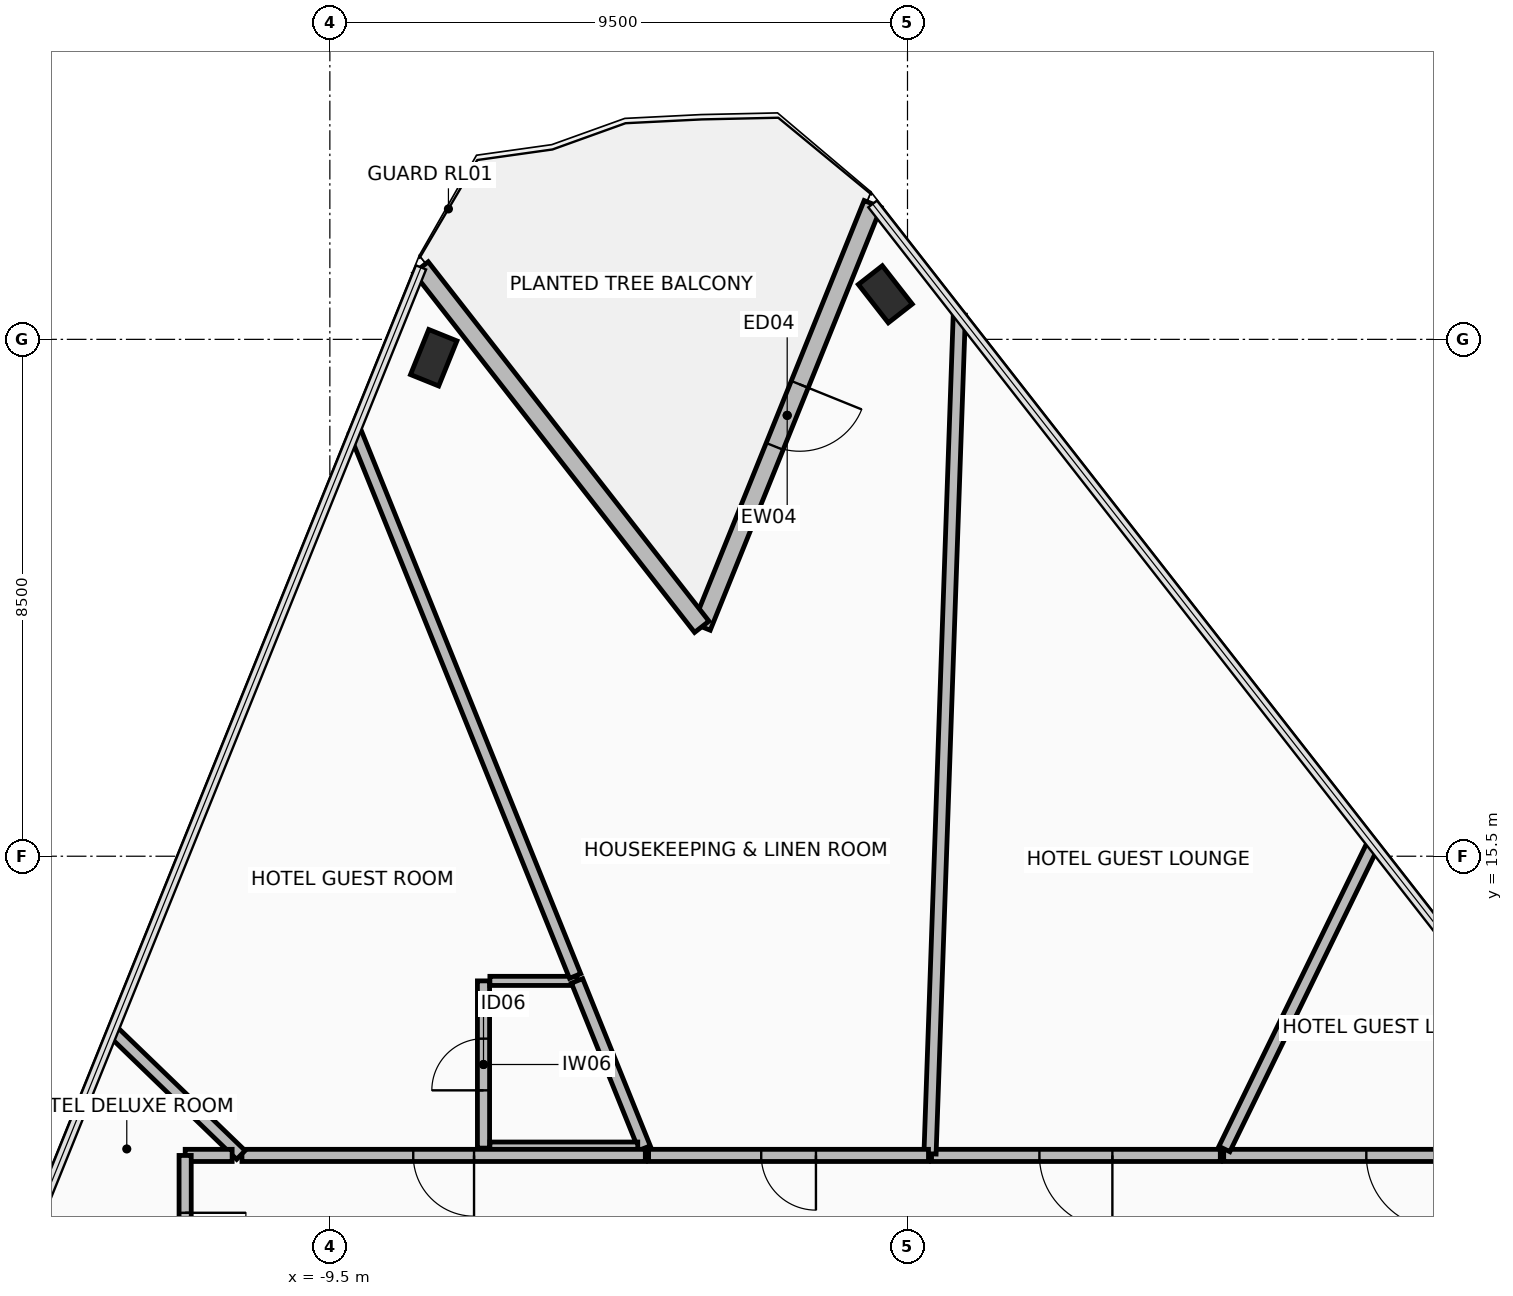
"""IFC4 building model, lengths in metres.
Left out: names, types, materials, properties, quantities, classifications, styles, units other than length and angle.
Written with IfcOpenShell. Run it as: python <this file> out.ifc"""

import sys

from ifc_helpers import new_model, si_unit, direction, frame, frame_2d, origin, origin_2d, place, context, subcontext, project, spatial, rectangle, hollow_rectangle, extrude, element, fill, save


model = new_model("IFC4")
c1 = context("Model", 3, precision=1e-05, world=origin(), true_north=direction((0.0, 1.0)))
c2 = subcontext(c1, "Body", "Model", "MODEL_VIEW")
j1 = project(units=[si_unit("LENGTHUNIT", "METRE"), si_unit("PLANEANGLEUNIT", "RADIAN")], contexts=[c1])
p1 = place(None, origin())
s1 = spatial("IfcSite", under=j1, at=p1, CompositionType="ELEMENT")
p2 = place(p1, origin())
s2 = spatial("IfcBuilding", under=s1, at=p2, CompositionType="ELEMENT")
p3 = place(p2, frame((0.0, 0.0, 67.3)))
s3 = spatial("IfcBuildingStorey", under=s2, at=p3, CompositionType="ELEMENT", Elevation=67.3)
for number, where, z_axis, x_axis in (
    (1, (-7.792, 23.698, 0.0), (0.0, 0.0, 1.0), (0.375, 0.927, 0.0)),
    (2, (-0.365, 24.741, 0.0), (0.0, 0.0, 1.0), (-0.616, 0.788, 0.0)),
):
    element("IfcColumn", number, at=place(p3, frame(where, z_axis=z_axis, x_axis=x_axis)), inside=s3, PredefinedType="COLUMN", context=c2, shape_type="SweptSolid", body=[
        extrude(hollow_rectangle(XDim=0.5, YDim=0.8, WallThickness=0.04, at=origin_2d()), origin(), (0.0, 0.0, 1.0), 3.45),
    ])
p4 = place(p3, frame((-0.574, 26.227, 0.0), z_axis=(0.0, 0.0, 1.0), x_axis=(-0.374609979755, -0.92718248639, 0.0)))
e3 = element("IfcWall", 3, at=p4, inside=s3, PredefinedType="STANDARD", context=c2, shape_type="SweptSolid", body=[
    extrude(rectangle(XDim=7.5, YDim=0.3, at=frame_2d((3.75, 0.0))), origin(), (0.0, 0.0, 1.0), 2.47),
])
p5 = place(p4, frame((3.2, 0.0, 0.0)))
e4 = element("IfcOpeningElement", 4, at=p5, cuts=e3, PredefinedType="OPENING", context=c2, shape_type="SweptSolid", body=[
    extrude(rectangle(XDim=1.1, YDim=2.2, at=frame_2d((0.55, 1.1))), frame((0.0, 0.16, 0.0), z_axis=(0.0, -1.0, 0.0), x_axis=(1.0, 0.0, 0.0)), (0.0, 0.0, 1.0), 0.32),
])
p6 = place(p3, frame((-3.383, 19.273, 0.0), z_axis=(0.0, 0.0, 1.0), x_axis=(-0.615654149001, 0.788016477504, 0.0)))
e5 = element("IfcWall", 5, at=p6, inside=s3, PredefinedType="STANDARD", context=c2, shape_type="SweptSolid", body=[
    extrude(rectangle(XDim=7.5, YDim=0.3, at=frame_2d((3.75, 0.0))), origin(), (0.0, 0.0, 1.0), 2.47),
])
p7 = place(p3, frame((-6.973, 10.7, 0.0), z_axis=(0.0, 0.0, 1.0), x_axis=(0.0, 1.0, 0.0)))
e6 = element("IfcWall", 6, at=p7, inside=s3, PredefinedType="PARTITIONING", context=c2, shape_type="SweptSolid", body=[
    extrude(rectangle(XDim=2.75, YDim=0.2, at=frame_2d((1.375, 0.0))), origin(), (0.0, 0.0, 1.0), 2.62),
])
p8 = place(p7, frame((0.95, 0.0, 0.0)))
e7 = element("IfcOpeningElement", 7, at=p8, cuts=e6, PredefinedType="OPENING", context=c2, shape_type="SweptSolid", body=[
    extrude(rectangle(XDim=0.85, YDim=2.1, at=frame_2d((0.425, 1.05))), frame((0.0, 0.11, 0.0), z_axis=(0.0, -1.0, 0.0), x_axis=(1.0, 0.0, 0.0)), (0.0, 0.0, 1.0), 0.22),
])
p9 = place(p3, frame((-6.868, 13.45, 0.0), z_axis=(0.0, 0.0, 1.0), x_axis=(1.0, 0.0, 0.0)))
e8 = element("IfcWall", 8, at=p9, inside=s3, PredefinedType="PARTITIONING", context=c2, shape_type="SweptSolid", body=[
    extrude(rectangle(XDim=1.434, YDim=0.15, at=frame_2d((0.717, 0.0))), origin(), (0.0, 0.0, 1.0), 3.275),
])
p10 = place(p3, frame((-5.434, 13.45, 0.0), z_axis=(0.0, 0.0, 1.0), x_axis=(0.374610031927, -0.927182465311, 0.0)))
e9 = element("IfcWall", 9, at=p10, inside=s3, PredefinedType="PARTITIONING", context=c2, shape_type="SweptSolid", body=[
    extrude(rectangle(XDim=2.966, YDim=0.2, at=frame_2d((1.483, 0.0))), origin(), (0.0, 0.0, 1.0), 3.275),
])
p11 = place(p3, frame((-4.436, 10.7, 0.0), z_axis=(0.0, 0.0, 1.0), x_axis=(-1.0, 0.0, 0.0)))
e10 = element("IfcWall", 10, at=p11, inside=s3, PredefinedType="PARTITIONING", context=c2, shape_type="SweptSolid", body=[
    extrude(rectangle(XDim=2.432, YDim=0.2, at=frame_2d((1.216, 0.0))), origin(), (0.0, 0.0, 1.0), 3.275),
])
p12 = place(p3, frame((11.651, 10.58, 0.0), z_axis=(0.0, 0.0, 1.0), x_axis=(-1.0, 0.0, 0.0)))
e11 = element("IfcWall", 11, at=p12, inside=s3, PredefinedType="PARTITIONING", context=c2, shape_type="SweptSolid", body=[
    extrude(rectangle(XDim=6.451, YDim=0.2, at=frame_2d((3.225, 0.0))), origin(), (0.0, 0.0, 1.0), 2.47),
])
p13 = place(p12, frame((2.905, 0.0, 0.0)))
e12 = element("IfcOpeningElement", 12, at=p13, cuts=e11, PredefinedType="OPENING", context=c2, shape_type="SweptSolid", body=[
    extrude(rectangle(XDim=1.2, YDim=2.15, at=frame_2d((0.6, 1.075))), frame((0.0, 0.11, 0.0), z_axis=(0.0, -1.0, 0.0), x_axis=(1.0, 0.0, 0.0)), (0.0, 0.0, 1.0), 0.22),
])
p14 = place(p3, frame((5.211, 10.685, 0.0), z_axis=(0.0, 0.0, 1.0), x_axis=(0.438361496965, 0.898798752769, 0.0)))
e13 = element("IfcWall", 13, at=p14, inside=s3, PredefinedType="PARTITIONING", context=c2, shape_type="SweptSolid", body=[
    extrude(rectangle(XDim=5.574, YDim=0.2, at=frame_2d((2.787, 0.0))), origin(), (0.0, 0.0, 1.0), 2.47),
])
p15 = place(p3, frame((5.145, 10.58, 0.0), z_axis=(0.0, 0.0, 1.0), x_axis=(-1.0, 0.0, 0.0)))
e14 = element("IfcWall", 14, at=p15, inside=s3, PredefinedType="PARTITIONING", context=c2, shape_type="SweptSolid", body=[
    extrude(rectangle(XDim=4.749, YDim=0.2, at=frame_2d((2.375, 0.0))), origin(), (0.0, 0.0, 1.0), 2.67),
])
p16 = place(p15, frame((1.775, 0.0, 0.0)))
e15 = element("IfcOpeningElement", 15, at=p16, cuts=e14, PredefinedType="OPENING", context=c2, shape_type="SweptSolid", body=[
    extrude(rectangle(XDim=1.2, YDim=2.15, at=frame_2d((0.6, 1.075))), frame((0.0, 0.11, 0.0), z_axis=(0.0, -1.0, 0.0), x_axis=(1.0, 0.0, 0.0)), (0.0, 0.0, 1.0), 0.22),
])
p17 = place(p3, frame((0.37, 10.606, 0.0), z_axis=(0.0, 0.0, 1.0), x_axis=(0.03489353046, 0.999391035347, 0.0)))
e16 = element("IfcWall", 16, at=p17, inside=s3, PredefinedType="PARTITIONING", context=c2, shape_type="SweptSolid", body=[
    extrude(rectangle(XDim=13.804, YDim=0.2, at=frame_2d((6.902, 0.0))), origin(), (0.0, 0.0, 1.0), 2.47),
])
p18 = place(p3, frame((0.345, 10.58, 0.0), z_axis=(0.0, 0.0, 1.0), x_axis=(-1.0, 0.0, 0.0)))
e17 = element("IfcWall", 17, at=p18, inside=s3, PredefinedType="PARTITIONING", context=c2, shape_type="SweptSolid", body=[
    extrude(rectangle(XDim=4.603, YDim=0.2, at=frame_2d((2.302, 0.0))), origin(), (0.0, 0.0, 1.0), 3.275),
])
p19 = place(p18, frame((1.851, 0.0, 0.0)))
e18 = element("IfcOpeningElement", 18, at=p19, cuts=e17, PredefinedType="OPENING", context=c2, shape_type="SweptSolid", body=[
    extrude(rectangle(XDim=0.9, YDim=2.1, at=frame_2d((0.45, 1.05))), frame((0.0, 0.11, 0.0), z_axis=(0.0, -1.0, 0.0), x_axis=(1.0, 0.0, 0.0)), (0.0, 0.0, 1.0), 0.22),
])
p20 = place(p3, frame((-5.467, 13.53, 0.0), z_axis=(0.0, 0.0, 1.0), x_axis=(-0.374609771438, 0.927182570556, 0.0)))
e19 = element("IfcWall", 19, at=p20, inside=s3, PredefinedType="PARTITIONING", context=c2, shape_type="SweptSolid", body=[
    extrude(rectangle(XDim=9.656, YDim=0.2, at=frame_2d((4.828, 0.0))), origin(), (0.0, 0.0, 1.0), 2.47),
])
p21 = place(p3, frame((-4.312, 10.58, 0.0), z_axis=(0.0, 0.0, 1.0), x_axis=(-1.0, 0.0, 0.0)))
e20 = element("IfcWall", 20, at=p21, inside=s3, PredefinedType="PARTITIONING", context=c2, shape_type="SweptSolid", body=[
    extrude(rectangle(XDim=6.634, YDim=0.2, at=frame_2d((3.317, 0.0))), origin(), (0.0, 0.0, 1.0), 2.62),
])
p22 = place(p21, frame((2.817, 0.0, 0.0)))
e21 = element("IfcOpeningElement", 21, at=p22, cuts=e20, PredefinedType="OPENING", context=c2, shape_type="SweptSolid", body=[
    extrude(rectangle(XDim=1.0, YDim=2.15, at=frame_2d((0.5, 1.075))), frame((0.0, 0.11, 0.0), z_axis=(0.0, -1.0, 0.0), x_axis=(1.0, 0.0, 0.0)), (0.0, 0.0, 1.0), 0.22),
])
p23 = place(p3, frame((-10.963, 10.587, 0.0), z_axis=(0.0, 0.0, 1.0), x_axis=(-0.719299093908, 0.69470052073, 0.0)))
e22 = element("IfcWall", 22, at=p23, inside=s3, PredefinedType="PARTITIONING", context=c2, shape_type="SweptSolid", body=[
    extrude(rectangle(XDim=2.918, YDim=0.2, at=frame_2d((1.459, 0.0))), origin(), (0.0, 0.0, 1.0), 2.47),
])
p24 = place(p3, frame((-11.107, 10.58, 0.0), z_axis=(0.0, 0.0, 1.0), x_axis=(-1.0, 0.0, 0.0)))
e23 = element("IfcWall", 23, at=p24, inside=s3, PredefinedType="PARTITIONING", context=c2, shape_type="SweptSolid", body=[
    extrude(rectangle(XDim=0.772, YDim=0.2, at=frame_2d((0.386, 0.0))), origin(), (0.0, 0.0, 1.0), 3.275),
])
p25 = place(p3, frame((-11.88, 10.579, 0.0), z_axis=(0.0, 0.0, 1.0), x_axis=(0.0, -1.0, 0.0)))
e24 = element("IfcWall", 24, at=p25, inside=s3, PredefinedType="PARTITIONING", context=c2, shape_type="SweptSolid", body=[
    extrude(rectangle(XDim=3.445, YDim=0.2, at=frame_2d((1.723, 0.0))), origin(), (0.0, 0.0, 1.0), 2.67),
])
p26 = place(p25, frame((0.943, 0.0, 0.0)))
e25 = element("IfcOpeningElement", 25, at=p26, cuts=e24, PredefinedType="OPENING", context=c2, shape_type="SweptSolid", body=[
    extrude(rectangle(XDim=1.0, YDim=2.15, at=frame_2d((0.5, 1.075))), frame((0.0, 0.11, 0.0), z_axis=(0.0, -1.0, 0.0), x_axis=(1.0, 0.0, 0.0)), (0.0, 0.0, 1.0), 0.22),
])
p27 = place(p5, origin())
e26 = element("IfcDoor", 26, at=p27, inside=s3, OperationType="SINGLE_SWING_LEFT", PredefinedType="DOOR", context=c2, shape_type="SweptSolid", body=[
    extrude(rectangle(XDim=1.1, YDim=2.2, at=frame_2d((0.55, 1.1))), frame((0.0, 0.025, 0.0), z_axis=(0.0, -1.0, 0.0), x_axis=(1.0, 0.0, 0.0)), (0.0, 0.0, 1.0), 0.05),
])
fill(e4, e26)
p28 = place(p8, origin())
e27 = element("IfcDoor", 27, at=p28, inside=s3, OperationType="SINGLE_SWING_RIGHT", PredefinedType="DOOR", context=c2, shape_type="SweptSolid", body=[
    extrude(rectangle(XDim=0.85, YDim=2.1, at=frame_2d((0.425, 1.05))), frame((0.0, 0.025, 0.0), z_axis=(0.0, -1.0, 0.0), x_axis=(1.0, 0.0, 0.0)), (0.0, 0.0, 1.0), 0.05),
])
fill(e7, e27)
p29 = place(p13, origin())
e28 = element("IfcDoor", 28, at=p29, inside=s3, OperationType="SINGLE_SWING_LEFT", PredefinedType="DOOR", context=c2, shape_type="SweptSolid", body=[
    extrude(rectangle(XDim=1.2, YDim=2.15, at=frame_2d((0.6, 1.075))), frame((0.0, 0.025, 0.0), z_axis=(0.0, -1.0, 0.0), x_axis=(1.0, 0.0, 0.0)), (0.0, 0.0, 1.0), 0.05),
])
fill(e12, e28)
p30 = place(p16, origin())
e29 = element("IfcDoor", 29, at=p30, inside=s3, OperationType="SINGLE_SWING_LEFT", PredefinedType="DOOR", context=c2, shape_type="SweptSolid", body=[
    extrude(rectangle(XDim=1.2, YDim=2.15, at=frame_2d((0.6, 1.075))), frame((0.0, 0.025, 0.0), z_axis=(0.0, -1.0, 0.0), x_axis=(1.0, 0.0, 0.0)), (0.0, 0.0, 1.0), 0.05),
])
fill(e15, e29)
p31 = place(p19, origin())
e30 = element("IfcDoor", 30, at=p31, inside=s3, OperationType="SINGLE_SWING_LEFT", PredefinedType="DOOR", context=c2, shape_type="SweptSolid", body=[
    extrude(rectangle(XDim=0.9, YDim=2.1, at=frame_2d((0.45, 1.05))), frame((0.0, 0.025, 0.0), z_axis=(0.0, -1.0, 0.0), x_axis=(1.0, 0.0, 0.0)), (0.0, 0.0, 1.0), 0.05),
])
fill(e18, e30)
p32 = place(p22, origin())
e31 = element("IfcDoor", 31, at=p32, inside=s3, OperationType="SINGLE_SWING_LEFT", PredefinedType="DOOR", context=c2, shape_type="SweptSolid", body=[
    extrude(rectangle(XDim=1.0, YDim=2.15, at=frame_2d((0.5, 1.075))), frame((0.0, 0.025, 0.0), z_axis=(0.0, -1.0, 0.0), x_axis=(1.0, 0.0, 0.0)), (0.0, 0.0, 1.0), 0.05),
])
fill(e21, e31)
p33 = place(p26, origin())
e32 = element("IfcDoor", 32, at=p33, inside=s3, OperationType="SINGLE_SWING_LEFT", PredefinedType="DOOR", context=c2, shape_type="SweptSolid", body=[
    extrude(rectangle(XDim=1.0, YDim=2.15, at=frame_2d((0.5, 1.075))), frame((0.0, 0.025, 0.0), z_axis=(0.0, -1.0, 0.0), x_axis=(1.0, 0.0, 0.0)), (0.0, 0.0, 1.0), 0.05),
])
fill(e25, e32)
save(model, sys.argv[1])
